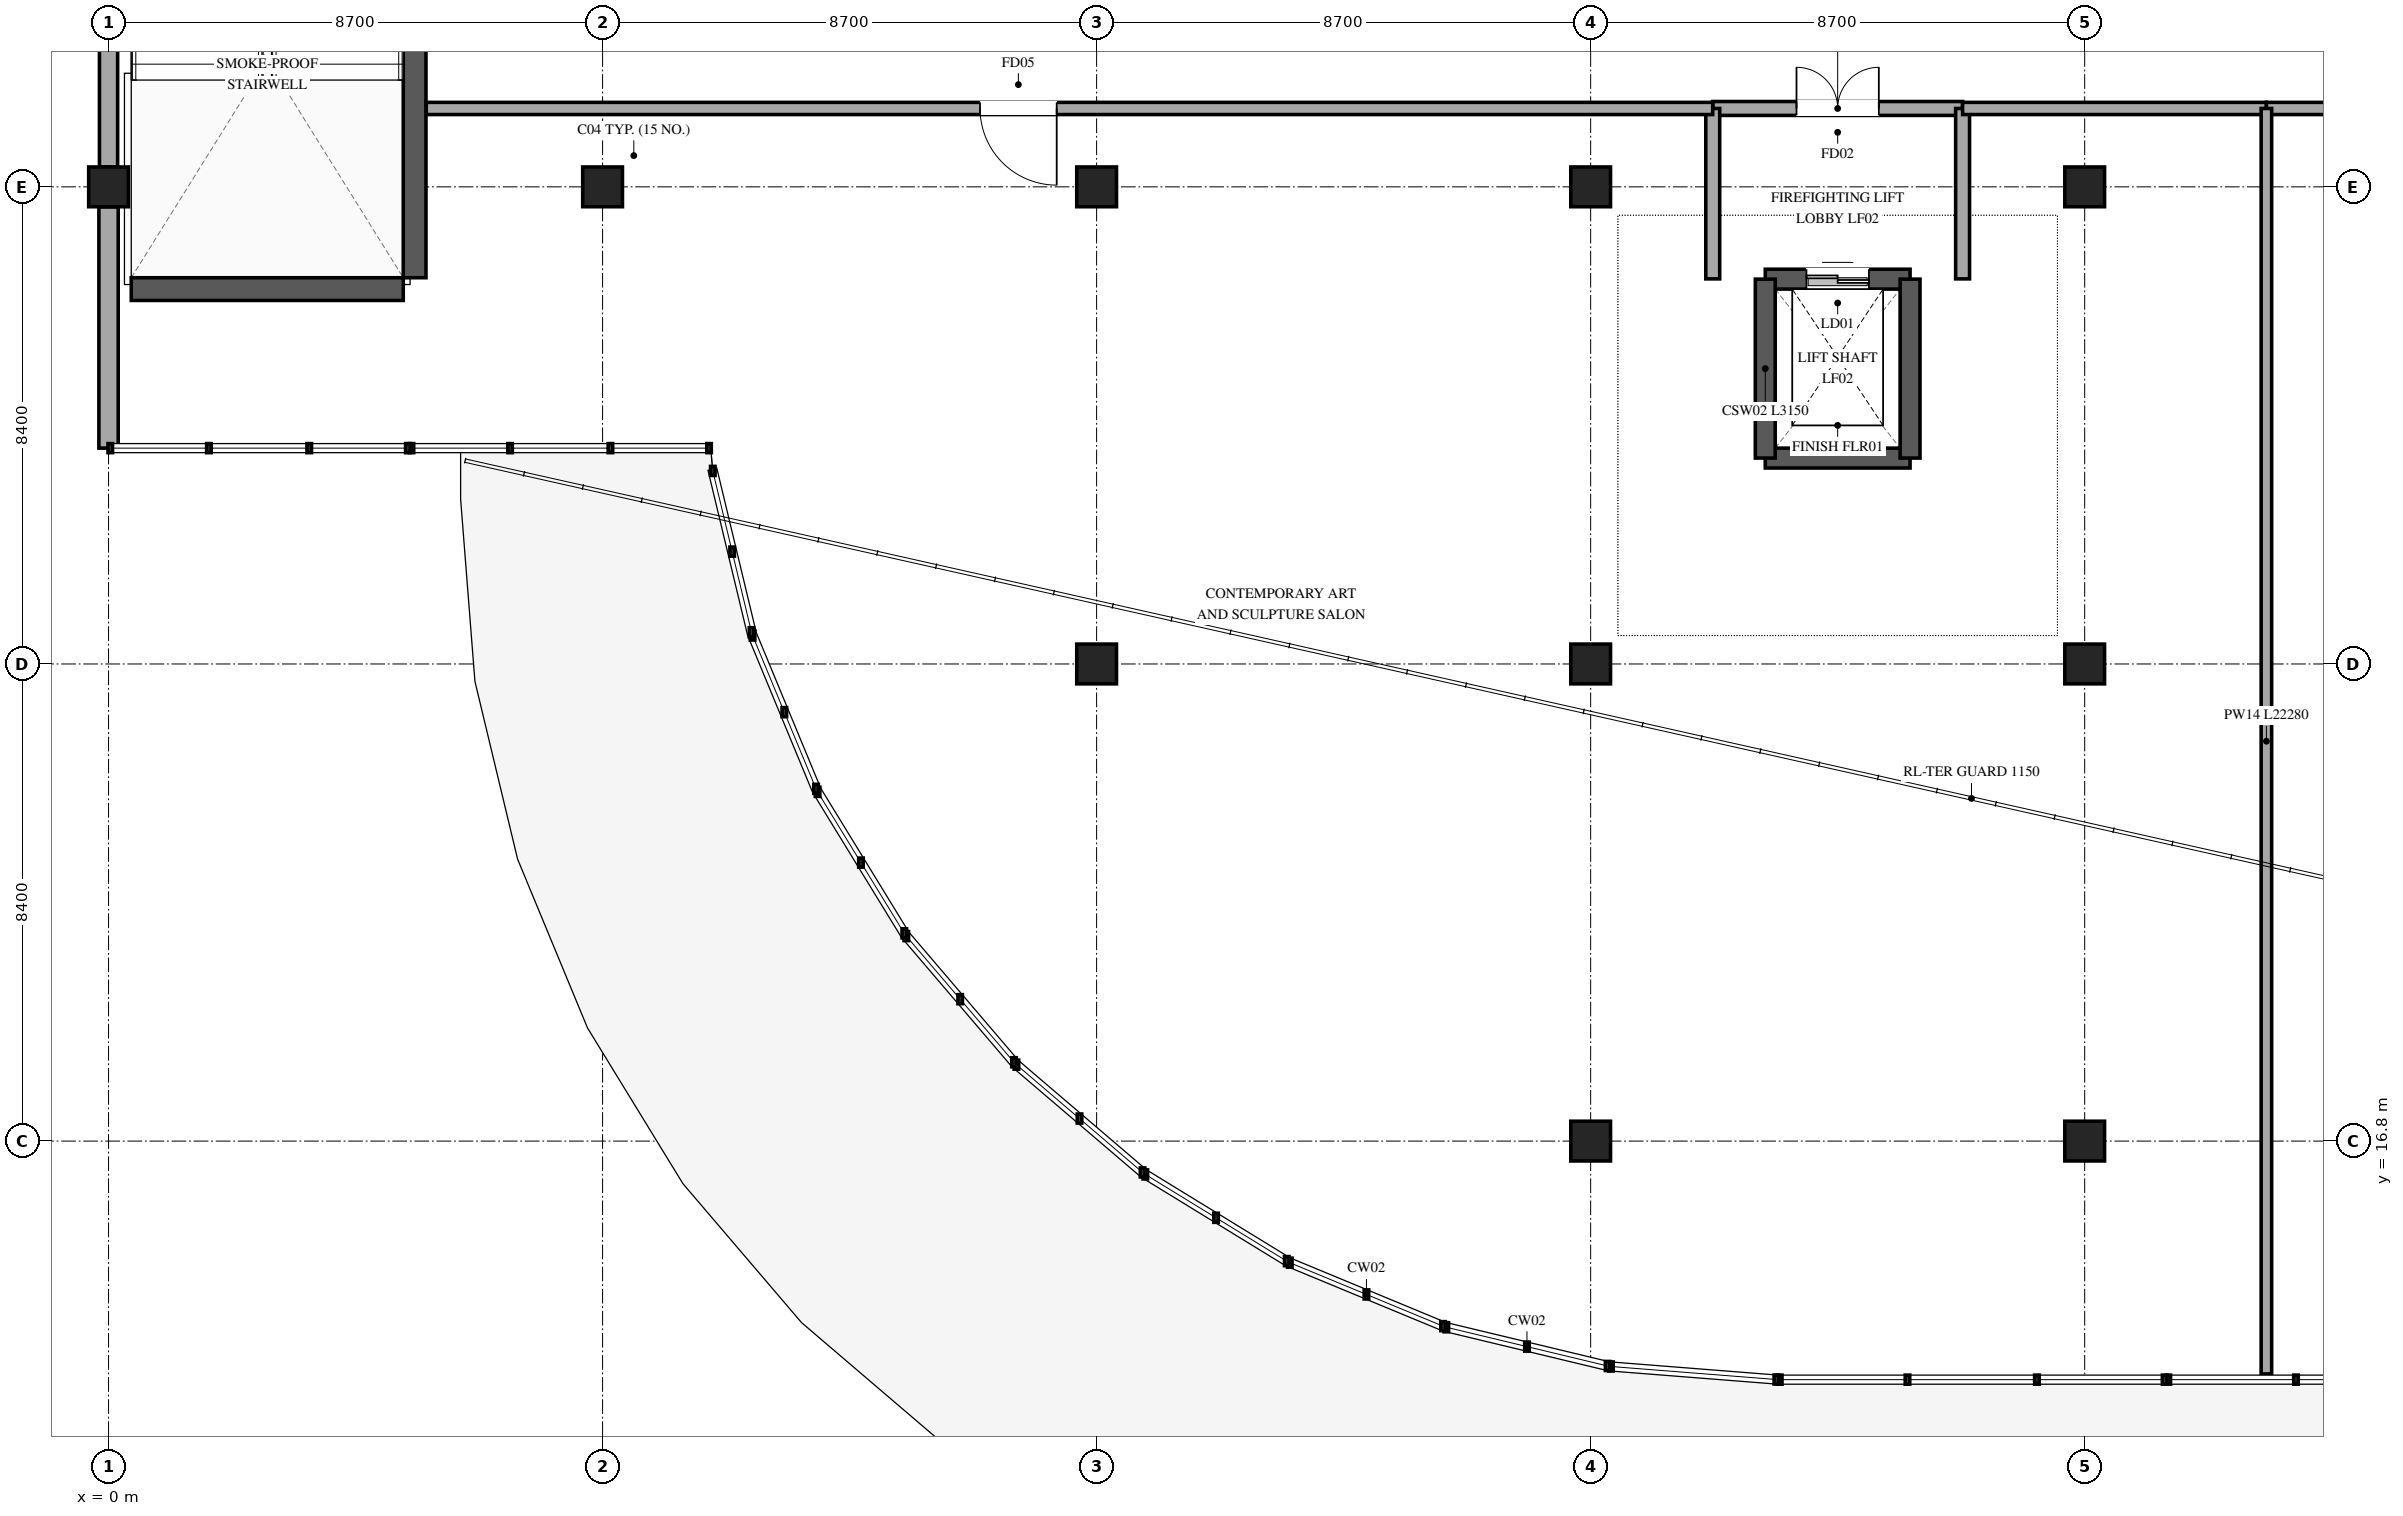
"""IFC4 building model, lengths in metres.
Left out: names, types, materials, properties, quantities, classifications, styles, units other than length and angle.
Written with IfcOpenShell. Run it as: python <this file> out.ifc"""

import sys

from ifc_helpers import new_model, si_unit, direction, frame, frame_2d, origin, origin_2d, place, context, subcontext, project, spatial, rectangle, extrude, element, fill, save


model = new_model("IFC4")
c1 = context("Model", 3, precision=1e-05, world=origin(), true_north=direction((0.0, 1.0)))
c2 = subcontext(c1, "Body", "Model", "MODEL_VIEW")
j1 = project(units=[si_unit("LENGTHUNIT", "METRE"), si_unit("PLANEANGLEUNIT", "RADIAN")], contexts=[c1])
p1 = place(None, origin())
s1 = spatial("IfcSite", under=j1, at=p1, CompositionType="ELEMENT")
p2 = place(p1, origin())
s2 = spatial("IfcBuilding", under=s1, at=p2, CompositionType="ELEMENT")
p3 = place(p2, frame((0.0, 0.0, 26.7)))
s3 = spatial("IfcBuildingStorey", under=s2, at=p3, CompositionType="ELEMENT", Elevation=26.7)
for number, where, z_axis, x_axis in (
    (1, (0.0, 33.6, 0.0), (0.0, 0.0, 1.0), (1.0, 0.0, 0.0)),
    (2, (8.7, 33.6, 0.0), (0.0, 0.0, 1.0), (1.0, 0.0, 0.0)),
    (3, (17.4, 25.2, 0.0), (0.0, 0.0, 1.0), (1.0, 0.0, 0.0)),
    (4, (17.4, 33.6, 0.0), (0.0, 0.0, 1.0), (1.0, 0.0, 0.0)),
    (5, (26.1, 16.8, 0.0), (0.0, 0.0, 1.0), (1.0, 0.0, 0.0)),
    (6, (26.1, 25.2, 0.0), (0.0, 0.0, 1.0), (1.0, 0.0, 0.0)),
    (7, (26.1, 33.6, 0.0), (0.0, 0.0, 1.0), (1.0, 0.0, 0.0)),
    (8, (34.8, 16.8, 0.0), (0.0, 0.0, 1.0), (1.0, 0.0, 0.0)),
    (9, (34.8, 25.2, 0.0), (0.0, 0.0, 1.0), (1.0, 0.0, 0.0)),
    (10, (34.8, 33.6, 0.0), (0.0, 0.0, 1.0), (1.0, 0.0, 0.0)),
):
    element("IfcColumn", number, at=place(p3, frame(where, z_axis=z_axis, x_axis=x_axis)), inside=s3, PredefinedType="COLUMN", context=c2, shape_type="SweptSolid", body=[
        extrude(rectangle(XDim=0.7, YDim=0.7, at=origin_2d()), origin(), (0.0, 0.0, 1.0), 4.8),
    ])
p4 = place(p3, frame((0.0, 29.0, 0.0), z_axis=(0.0, 0.0, 1.0), x_axis=(0.0, 1.0, 0.0)))
e11 = element("IfcWall", 11, at=p4, inside=s3, PredefinedType="STANDARD", context=c2, shape_type="SweptSolid", body=[
    extrude(rectangle(XDim=4.248, YDim=0.34, at=frame_2d((2.124, 0.0))), origin(), (0.0, 0.0, 1.0), 4.49),
])
p5 = place(p3, frame((0.0, 33.952, 0.0), z_axis=(0.0, 0.0, 1.0), x_axis=(0.0, 1.0, 0.0)))
e12 = element("IfcWall", 12, at=p5, inside=s3, PredefinedType="STANDARD", context=c2, shape_type="SweptSolid", body=[
    extrude(rectangle(XDim=7.696, YDim=0.32, at=frame_2d((3.848, 0.0))), origin(), (0.0, 0.0, 1.0), 4.49),
])
p6 = place(p3, frame((5.39, 42.0, 0.0), z_axis=(0.0, 0.0, 1.0), x_axis=(0.0, -1.0, 0.0)))
e13 = element("IfcWall", 13, at=p6, inside=s3, PredefinedType="SHEAR", context=c2, shape_type="SweptSolid", body=[
    extrude(rectangle(XDim=10.0, YDim=0.4, at=frame_2d((5.0, 0.0))), origin(), (0.0, 0.0, 1.0), 4.8),
])
p7 = place(p6, frame((0.41, 0.0, 0.0)))
e14 = element("IfcOpeningElement", 14, at=p7, cuts=e13, PredefinedType="OPENING", context=c2, shape_type="SweptSolid", body=[
    extrude(rectangle(XDim=1.5, YDim=2.2, at=frame_2d((0.75, 1.1))), frame((0.0, 0.21, 0.0), z_axis=(0.0, -1.0, 0.0), x_axis=(1.0, 0.0, 0.0)), (0.0, 0.0, 1.0), 0.42),
])
p8 = place(p3, frame((5.19, 31.8, 0.0), z_axis=(0.0, 0.0, 1.0), x_axis=(-1.0, 0.0, 0.0)))
e15 = element("IfcWall", 15, at=p8, inside=s3, PredefinedType="SHEAR", context=c2, shape_type="SweptSolid", body=[
    extrude(rectangle(XDim=4.79, YDim=0.4, at=frame_2d((2.395, 0.0))), origin(), (0.0, 0.0, 1.0), 4.8),
])
p9 = place(p3, frame((29.175, 31.975, 0.0), z_axis=(0.0, 0.0, 1.0), x_axis=(1.0, 0.0, 0.0)))
e16 = element("IfcWall", 16, at=p9, inside=s3, PredefinedType="SHEAR", context=c2, shape_type="SweptSolid", body=[
    extrude(rectangle(XDim=2.55, YDim=0.35, at=frame_2d((1.275, 0.0))), origin(), (0.0, 0.0, 1.0), 4.8),
])
p10 = place(p9, frame((0.725, 0.0, 0.0)))
e17 = element("IfcOpeningElement", 17, at=p10, cuts=e16, PredefinedType="OPENING", context=c2, shape_type="SweptSolid", body=[
    extrude(rectangle(XDim=1.1, YDim=2.2, at=frame_2d((0.55, 1.1))), frame((0.0, 0.185, 0.0), z_axis=(0.0, -1.0, 0.0), x_axis=(1.0, 0.0, 0.0)), (0.0, 0.0, 1.0), 0.37),
])
p11 = place(p3, frame((31.725, 28.825, 0.0), z_axis=(0.0, 0.0, 1.0), x_axis=(-1.0, 0.0, 0.0)))
e18 = element("IfcWall", 18, at=p11, inside=s3, PredefinedType="SHEAR", context=c2, shape_type="SweptSolid", body=[
    extrude(rectangle(XDim=2.55, YDim=0.35, at=frame_2d((1.275, 0.0))), origin(), (0.0, 0.0, 1.0), 4.8),
])
for number, where, z_axis, x_axis in (
    (19, (29.175, 28.825, 0.0), (0.0, 0.0, 1.0), (0.0, 1.0, 0.0)),
    (20, (31.725, 31.975, 0.0), (0.0, 0.0, 1.0), (0.0, -1.0, 0.0)),
):
    element("IfcWall", number, at=place(p3, frame(where, z_axis=z_axis, x_axis=x_axis)), inside=s3, PredefinedType="SHEAR", context=c2, shape_type="SweptSolid", body=[
        extrude(rectangle(XDim=3.15, YDim=0.35, at=frame_2d((1.575, 0.0))), origin(), (0.0, 0.0, 1.0), 4.8),
    ])
p12 = place(p3, frame((28.25, 34.98, 0.0), z_axis=(0.0, 0.0, 1.0), x_axis=(1.0, 0.0, 0.0)))
e21 = element("IfcWall", 21, at=p12, inside=s3, PredefinedType="STANDARD", context=c2, shape_type="SweptSolid", body=[
    extrude(rectangle(XDim=4.4, YDim=0.245, at=frame_2d((2.2, 0.0))), origin(), (0.0, 0.0, 1.0), 4.46),
])
p13 = place(p12, frame((1.475, 0.0, 0.0)))
e22 = element("IfcOpeningElement", 22, at=p13, cuts=e21, PredefinedType="OPENING", context=c2, shape_type="SweptSolid", body=[
    extrude(rectangle(XDim=1.45, YDim=2.2, at=frame_2d((0.725, 1.1))), frame((0.0, 0.133, 0.0), z_axis=(0.0, -1.0, 0.0), x_axis=(1.0, 0.0, 0.0)), (0.0, 0.0, 1.0), 0.265),
])
for number, where, z_axis, x_axis in (
    (23, (28.25, 31.98, 0.0), (0.0, 0.0, 1.0), (0.0, 1.0, 0.0)),
    (24, (32.65, 34.98, 0.0), (0.0, 0.0, 1.0), (0.0, -1.0, 0.0)),
):
    element("IfcWall", number, at=place(p3, frame(where, z_axis=z_axis, x_axis=x_axis)), inside=s3, PredefinedType="STANDARD", context=c2, shape_type="SweptSolid", body=[
        extrude(rectangle(XDim=3.0, YDim=0.245, at=frame_2d((1.5, 0.0))), origin(), (0.0, 0.0, 1.0), 3.76),
    ])
p14 = place(p3, frame((28.25, 34.98, 0.0), z_axis=(0.0, 0.0, 1.0), x_axis=(-1.0, 0.0, 0.0)))
e25 = element("IfcWall", 25, at=p14, inside=s3, PredefinedType="PARTITIONING", context=c2, shape_type="SweptSolid", body=[
    extrude(rectangle(XDim=22.655, YDim=0.215, at=frame_2d((11.328, 0.0))), origin(), (0.0, 0.0, 1.0), 3.76),
])
p15 = place(p14, frame((11.553, 0.0, 0.0)))
e26 = element("IfcOpeningElement", 26, at=p15, cuts=e25, PredefinedType="OPENING", context=c2, shape_type="SweptSolid", body=[
    extrude(rectangle(XDim=1.35, YDim=2.2, at=frame_2d((0.675, 1.1))), frame((0.0, 0.118, 0.0), z_axis=(0.0, -1.0, 0.0), x_axis=(1.0, 0.0, 0.0)), (0.0, 0.0, 1.0), 0.235),
])
p16 = place(p3, frame((38.0, 34.98, 0.0), z_axis=(0.0, 0.0, 1.0), x_axis=(-1.0, 0.0, 0.0)))
e27 = element("IfcWall", 27, at=p16, inside=s3, PredefinedType="PARTITIONING", context=c2, shape_type="SweptSolid", body=[
    extrude(rectangle(XDim=5.35, YDim=0.215, at=frame_2d((2.675, 0.0))), origin(), (0.0, 0.0, 1.0), 3.76),
])
p17 = place(p3, frame((44.6, 34.98, 0.0), z_axis=(0.0, 0.0, 1.0), x_axis=(-1.0, 0.0, 0.0)))
e28 = element("IfcWall", 28, at=p17, inside=s3, PredefinedType="PARTITIONING", context=c2, shape_type="SweptSolid", body=[
    extrude(rectangle(XDim=6.6, YDim=0.215, at=frame_2d((3.3, 0.0))), origin(), (0.0, 0.0, 1.0), 3.76),
])
p18 = place(p17, frame((2.625, 0.0, 0.0)))
e29 = element("IfcOpeningElement", 29, at=p18, cuts=e28, PredefinedType="OPENING", context=c2, shape_type="SweptSolid", body=[
    extrude(rectangle(XDim=1.35, YDim=2.2, at=frame_2d((0.675, 1.1))), frame((0.0, 0.118, 0.0), z_axis=(0.0, -1.0, 0.0), x_axis=(1.0, 0.0, 0.0)), (0.0, 0.0, 1.0), 0.235),
])
p19 = place(p3, frame((38.0, 34.98, 0.0), z_axis=(0.0, 0.0, 1.0), x_axis=(0.0, -1.0, 0.0)))
e30 = element("IfcWall", 30, at=p19, inside=s3, PredefinedType="PARTITIONING", context=c2, shape_type="SweptSolid", body=[
    extrude(rectangle(XDim=22.28, YDim=0.185, at=frame_2d((11.14, 0.0))), origin(), (0.0, 0.0, 1.0), 3.76),
])
p20 = place(p10, origin())
e31 = element("IfcDoor", 31, at=p20, inside=s3, OperationType="DOUBLE_DOOR_SLIDING", PredefinedType="DOOR", context=c2, shape_type="SweptSolid", body=[
    extrude(rectangle(XDim=1.1, YDim=2.2, at=frame_2d((0.55, 1.1))), frame((0.0, 0.025, 0.0), z_axis=(0.0, -1.0, 0.0), x_axis=(1.0, 0.0, 0.0)), (0.0, 0.0, 1.0), 0.05),
])
fill(e17, e31)
p21 = place(p13, origin())
e32 = element("IfcDoor", 32, at=p21, inside=s3, OperationType="DOUBLE_DOOR_SINGLE_SWING", PredefinedType="DOOR", context=c2, shape_type="SweptSolid", body=[
    extrude(rectangle(XDim=1.45, YDim=2.2, at=frame_2d((0.725, 1.1))), frame((0.0, 0.025, 0.0), z_axis=(0.0, -1.0, 0.0), x_axis=(1.0, 0.0, 0.0)), (0.0, 0.0, 1.0), 0.05),
])
fill(e22, e32)
p22 = place(p15, origin())
e33 = element("IfcDoor", 33, at=p22, inside=s3, OperationType="SINGLE_SWING_LEFT", PredefinedType="DOOR", context=c2, shape_type="SweptSolid", body=[
    extrude(rectangle(XDim=1.35, YDim=2.2, at=frame_2d((0.675, 1.1))), frame((0.0, 0.025, 0.0), z_axis=(0.0, -1.0, 0.0), x_axis=(1.0, 0.0, 0.0)), (0.0, 0.0, 1.0), 0.05),
])
fill(e26, e33)
save(model, sys.argv[1])
